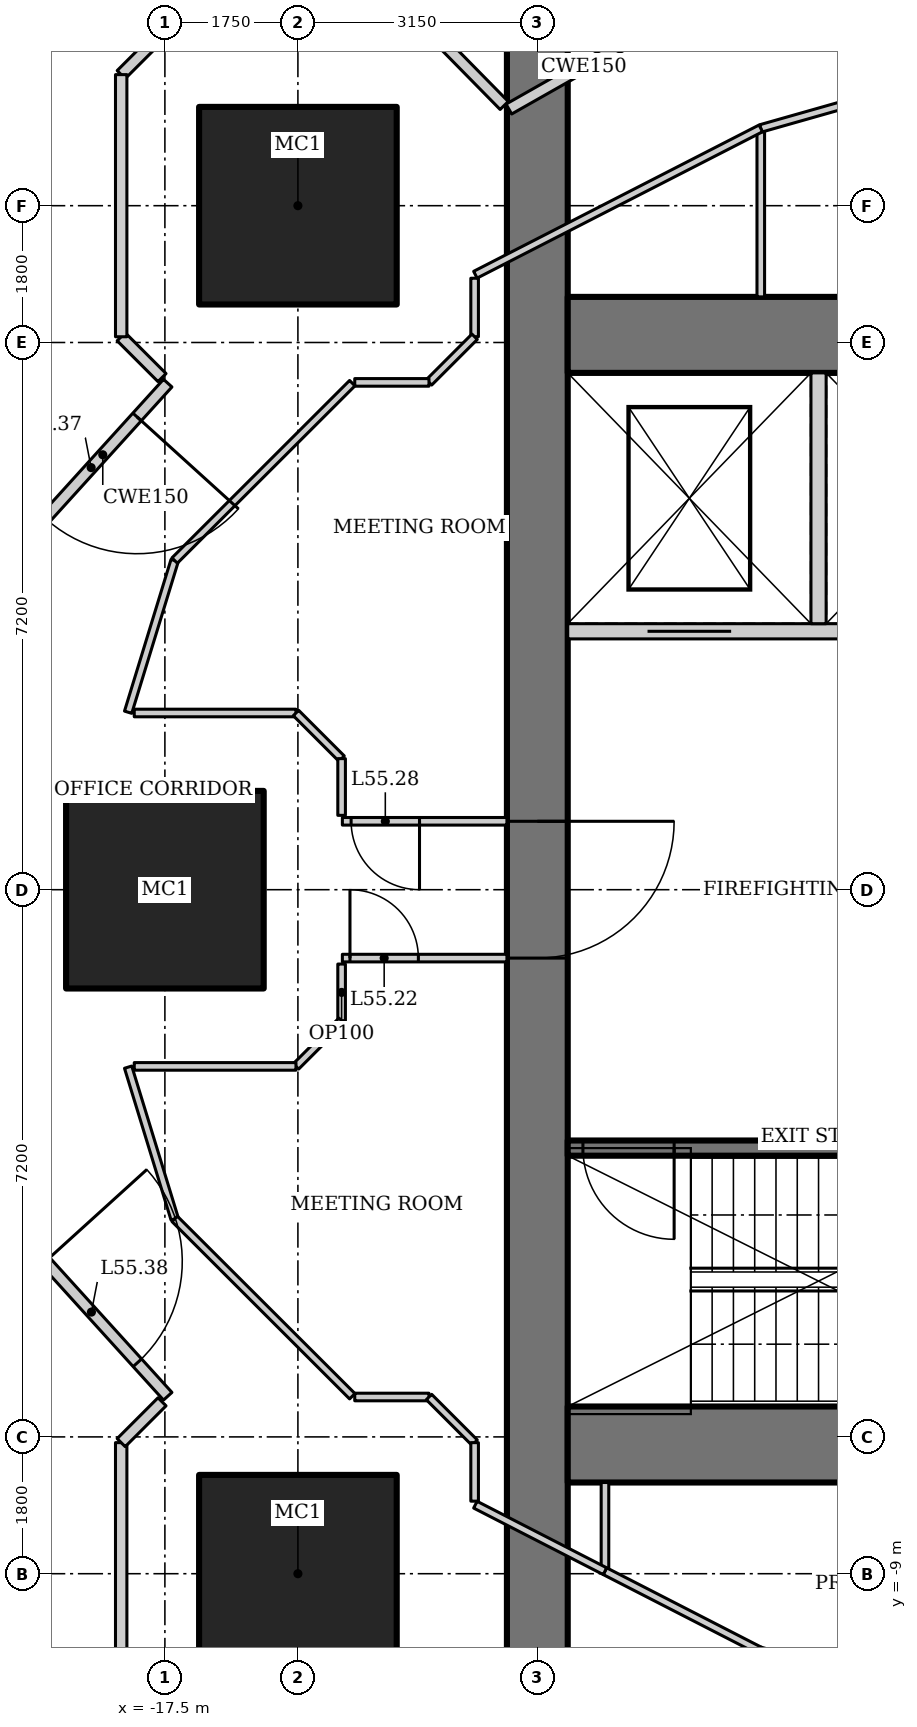
"""IFC4 building model, lengths in metres.
Left out: names, types, materials, properties, quantities, classifications, styles, units other than length and angle.
Written with IfcOpenShell. Run it as: python <this file> out.ifc"""

import sys

from ifc_helpers import new_model, si_unit, direction, frame, frame_2d, origin, origin_2d, place, context, subcontext, project, spatial, rectangle, hollow_rectangle, extrude, element, fill, save


model = new_model("IFC4")
c1 = context("Model", 3, precision=1e-05, world=origin(), true_north=direction((0.0, 1.0)))
c2 = subcontext(c1, "Body", "Model", "MODEL_VIEW")
j1 = project(units=[si_unit("LENGTHUNIT", "METRE"), si_unit("PLANEANGLEUNIT", "RADIAN")], contexts=[c1])
p1 = place(None, origin())
s1 = spatial("IfcSite", under=j1, at=p1, CompositionType="ELEMENT")
p2 = place(p1, origin())
s2 = spatial("IfcBuilding", under=s1, at=p2, CompositionType="ELEMENT")
p3 = place(p2, frame((0.0, 0.0, 236.8)))
s3 = spatial("IfcBuildingStorey", under=s2, at=p3, CompositionType="ELEMENT", Elevation=236.8)
for number, where, z_axis, x_axis in (
    (1, (-15.75, 9.0, 0.0), (0.0, 0.0, 1.0), (1.0, 0.0, 0.0)),
    (2, (-17.5, 0.0, 0.0), (0.0, 0.0, 1.0), (1.0, 0.0, 0.0)),
    (3, (-15.75, -9.0, 0.0), (0.0, 0.0, 1.0), (1.0, 0.0, 0.0)),
):
    element("IfcColumn", number, at=place(p3, frame(where, z_axis=z_axis, x_axis=x_axis)), inside=s3, PredefinedType="COLUMN", context=c2, shape_type="SweptSolid", body=[
        extrude(hollow_rectangle(XDim=2.6, YDim=2.6, WallThickness=0.13, at=origin_2d()), origin(), (0.0, 0.0, 1.0), 4.2),
    ])
p4 = place(p3, frame((-12.6, 13.0, 0.0), z_axis=(0.0, 0.0, 1.0), x_axis=(0.0, -1.0, 0.0)))
e4 = element("IfcWall", 4, at=p4, inside=s3, PredefinedType="SHEAR", context=c2, shape_type="SweptSolid", body=[
    extrude(rectangle(XDim=26.0, YDim=0.8, at=frame_2d((13.0, 0.0))), origin(), (0.0, 0.0, 1.0), 4.2),
])
p5 = place(p4, frame((12.1, 0.0, 0.0)))
e5 = element("IfcOpeningElement", 5, at=p5, cuts=e4, PredefinedType="OPENING", context=c2, shape_type="SweptSolid", body=[
    extrude(rectangle(XDim=1.8, YDim=2.1, at=frame_2d((0.9, 1.05))), frame((0.0, 0.41, 0.0), z_axis=(0.0, -1.0, 0.0), x_axis=(1.0, 0.0, 0.0)), (0.0, 0.0, 1.0), 0.82),
])
p6 = place(p3, frame((-12.2, -7.3, 0.0), z_axis=(0.0, 0.0, 1.0), x_axis=(1.0, 0.0, 0.0)))
e6 = element("IfcWall", 6, at=p6, inside=s3, PredefinedType="SHEAR", context=c2, shape_type="SweptSolid", body=[
    extrude(rectangle(XDim=24.4, YDim=1.0, at=frame_2d((12.2, 0.0))), origin(), (0.0, 0.0, 1.0), 4.2),
])
p7 = place(p3, frame((-5.6, 7.3, 0.0), z_axis=(0.0, 0.0, 1.0), x_axis=(-1.0, 0.0, 0.0)))
e7 = element("IfcWall", 7, at=p7, inside=s3, PredefinedType="SHEAR", context=c2, shape_type="SweptSolid", body=[
    extrude(rectangle(XDim=6.6, YDim=1.0, at=frame_2d((3.3, 0.0))), origin(), (0.0, 0.0, 1.0), 4.2),
])
p8 = place(p3, frame((-5.6, -3.4, 0.0), z_axis=(0.0, 0.0, 1.0), x_axis=(-1.0, 0.0, 0.0)))
e8 = element("IfcWall", 8, at=p8, inside=s3, PredefinedType="SHEAR", context=c2, shape_type="SweptSolid", body=[
    extrude(rectangle(XDim=6.6, YDim=0.2, at=frame_2d((3.3, 0.0))), origin(), (0.0, 0.0, 1.0), 4.2),
])
p9 = place(p8, frame((5.2, 0.0, 0.0)))
e9 = element("IfcOpeningElement", 9, at=p9, cuts=e8, PredefinedType="OPENING", context=c2, shape_type="SweptSolid", body=[
    extrude(rectangle(XDim=1.2, YDim=2.1, at=frame_2d((0.6, 1.05))), frame((0.0, 0.11, 0.0), z_axis=(0.0, -1.0, 0.0), x_axis=(1.0, 0.0, 0.0)), (0.0, 0.0, 1.0), 0.22),
])
p10 = place(p3, frame((-12.2, 3.4, 0.0), z_axis=(0.0, 0.0, 1.0), x_axis=(1.0, 0.0, 0.0)))
e10 = element("IfcWall", 10, at=p10, inside=s3, PredefinedType="SOLIDWALL", context=c2, shape_type="SweptSolid", body=[
    extrude(rectangle(XDim=6.6, YDim=0.2, at=frame_2d((3.3, 0.0))), origin(), (0.0, 0.0, 1.0), 4.2),
])
p11 = place(p10, frame((1.05, 0.0, 0.0)))
e11 = element("IfcOpeningElement", 11, at=p11, cuts=e10, PredefinedType="OPENING", context=c2, shape_type="SweptSolid", body=[
    extrude(rectangle(XDim=1.1, YDim=2.2, at=frame_2d((0.55, 1.1))), frame((0.0, 0.11, 0.0), z_axis=(0.0, -1.0, 0.0), x_axis=(1.0, 0.0, 0.0)), (0.0, 0.0, 1.0), 0.22),
])
p12 = place(p10, frame((4.3, 0.0, 0.0)))
e12 = element("IfcOpeningElement", 12, at=p12, cuts=e10, PredefinedType="OPENING", context=c2, shape_type="SweptSolid", body=[
    extrude(rectangle(XDim=1.4, YDim=2.2, at=frame_2d((0.7, 1.1))), frame((0.0, 0.11, 0.0), z_axis=(0.0, -1.0, 0.0), x_axis=(1.0, 0.0, 0.0)), (0.0, 0.0, 1.0), 0.22),
])
p13 = place(p3, frame((-8.9, 3.5, 0.0), z_axis=(0.0, 0.0, 1.0), x_axis=(0.0, 1.0, 0.0)))
e13 = element("IfcWall", 13, at=p13, inside=s3, PredefinedType="SOLIDWALL", context=c2, shape_type="SweptSolid", body=[
    extrude(rectangle(XDim=3.3, YDim=0.2, at=frame_2d((1.65, 0.0))), origin(), (0.0, 0.0, 1.0), 4.2),
])
p14 = place(p3, frame((-11.71, -7.8, 0.0), z_axis=(0.0, 0.0, 1.0), x_axis=(0.0, -1.0, 0.0)))
e14 = element("IfcWall", 14, at=p14, inside=s3, PredefinedType="PARTITIONING", context=c2, shape_type="SweptSolid", body=[
    extrude(rectangle(XDim=1.167, YDim=0.1, at=frame_2d((0.583, 0.0))), origin(), (0.0, 0.0, 1.0), 4.05),
])
p15 = place(p3, frame((-5.68, -11.147, 0.0), z_axis=(0.0, 0.0, 1.0), x_axis=(-0.961973498971, 0.273142796496, 0.0)))
e15 = element("IfcWall", 15, at=p15, inside=s3, PredefinedType="PARTITIONING", context=c2, shape_type="SweptSolid", body=[
    extrude(rectangle(XDim=4.148, YDim=0.1, at=frame_2d((2.074, 0.0))), origin(), (0.0, 0.0, 1.0), 4.05),
])
p16 = place(p15, frame((1.624, 0.0, 0.0)))
e16 = element("IfcOpeningElement", 16, at=p16, cuts=e15, PredefinedType="OPENING", context=c2, shape_type="SweptSolid", body=[
    extrude(rectangle(XDim=0.9, YDim=2.1, at=frame_2d((0.45, 1.05))), frame((0.0, 0.06, 0.0), z_axis=(0.0, -1.0, 0.0), x_axis=(1.0, 0.0, 0.0)), (0.0, 0.0, 1.0), 0.12),
])
p17 = place(p3, frame((-9.67, -10.014, 0.0), z_axis=(0.0, 0.0, 1.0), x_axis=(-0.889605609385, 0.456729525814, 0.0)))
e17 = element("IfcWall", 17, at=p17, inside=s3, PredefinedType="PARTITIONING", context=c2, shape_type="SweptSolid", body=[
    extrude(rectangle(XDim=2.293, YDim=0.1, at=frame_2d((1.146, 0.0))), origin(), (0.0, 0.0, 1.0), 4.05),
])
p18 = place(p3, frame((-9.66, 10.017, 0.0), z_axis=(0.0, 0.0, 1.0), x_axis=(0.0, -1.0, 0.0)))
e18 = element("IfcWall", 18, at=p18, inside=s3, PredefinedType="PARTITIONING", context=c2, shape_type="SweptSolid", body=[
    extrude(rectangle(XDim=2.217, YDim=0.1, at=frame_2d((1.108, 0.0))), origin(), (0.0, 0.0, 1.0), 4.05),
])
p19 = place(p3, frame((-9.66, 10.017, 0.0), z_axis=(0.0, 0.0, 1.0), x_axis=(0.961970251804, 0.27315423234, 0.0)))
e19 = element("IfcWall", 19, at=p19, inside=s3, PredefinedType="PARTITIONING", context=c2, shape_type="SweptSolid", body=[
    extrude(rectangle(XDim=4.137, YDim=0.1, at=frame_2d((2.069, 0.0))), origin(), (0.0, 0.0, 1.0), 4.05),
])
p20 = place(p3, frame((-17.372, -4.331, 0.0), z_axis=(0.0, 0.0, 1.0), x_axis=(-0.293231279211, 0.956041535129, 0.0)))
e20 = element("IfcWall", 20, at=p20, inside=s3, PredefinedType="PARTITIONING", context=c2, shape_type="SweptSolid", body=[
    extrude(rectangle(XDim=2.088, YDim=0.1, at=frame_2d((1.044, 0.0))), origin(), (0.0, 0.0, 1.0), 4.05),
])
p21 = place(p3, frame((-15.165, -0.9, 0.0), z_axis=(0.0, 0.0, 1.0), x_axis=(1.0, 0.0, 0.0)))
e21 = element("IfcWall", 21, at=p21, inside=s3, PredefinedType="PARTITIONING", context=c2, shape_type="SweptSolid", body=[
    extrude(rectangle(XDim=2.165, YDim=0.1, at=frame_2d((1.083, 0.0))), origin(), (0.0, 0.0, 1.0), 4.05),
])
p22 = place(p21, frame((0.1, 0.0, 0.0)))
e22 = element("IfcOpeningElement", 22, at=p22, cuts=e21, PredefinedType="OPENING", context=c2, shape_type="SweptSolid", body=[
    extrude(rectangle(XDim=0.9, YDim=2.1, at=frame_2d((0.45, 1.05))), frame((0.0, 0.06, 0.0), z_axis=(0.0, -1.0, 0.0), x_axis=(1.0, 0.0, 0.0)), (0.0, 0.0, 1.0), 0.12),
])
p23 = place(p3, frame((-13.0, 0.9, 0.0), z_axis=(0.0, 0.0, 1.0), x_axis=(-1.0, 0.0, 0.0)))
e23 = element("IfcWall", 23, at=p23, inside=s3, PredefinedType="PARTITIONING", context=c2, shape_type="SweptSolid", body=[
    extrude(rectangle(XDim=2.165, YDim=0.1, at=frame_2d((1.083, 0.0))), origin(), (0.0, 0.0, 1.0), 4.05),
])
p24 = place(p23, frame((1.15, 0.0, 0.0)))
e24 = element("IfcOpeningElement", 24, at=p24, cuts=e23, PredefinedType="OPENING", context=c2, shape_type="SweptSolid", body=[
    extrude(rectangle(XDim=0.9, YDim=2.1, at=frame_2d((0.45, 1.05))), frame((0.0, 0.06, 0.0), z_axis=(0.0, -1.0, 0.0), x_axis=(1.0, 0.0, 0.0)), (0.0, 0.0, 1.0), 0.12),
])
p25 = place(p3, frame((-17.984, 2.335, 0.0), z_axis=(0.0, 0.0, 1.0), x_axis=(0.293231279211, 0.956041535129, 0.0)))
e25 = element("IfcWall", 25, at=p25, inside=s3, PredefinedType="PARTITIONING", context=c2, shape_type="SweptSolid", body=[
    extrude(rectangle(XDim=2.088, YDim=0.1, at=frame_2d((1.044, 0.0))), origin(), (0.0, 0.0, 1.0), 4.05),
])
p26 = place(p3, frame((-15.175, -0.978, 0.0), z_axis=(0.0, 0.0, 1.0), x_axis=(0.0, -1.0, 0.0)))
e26 = element("IfcWall", 26, at=p26, inside=s3, PredefinedType="PARTITIONING", context=c2, shape_type="SweptSolid", body=[
    extrude(rectangle(XDim=0.746, YDim=0.1, at=frame_2d((0.373, 0.0))), origin(), (0.0, 0.0, 1.0), 4.05),
])
p27 = place(p3, frame((-15.175, -1.725, 0.0), z_axis=(0.0, 0.0, 1.0), x_axis=(-0.707106781187, -0.707106781187, 0.0)))
e27 = element("IfcWall", 27, at=p27, inside=s3, PredefinedType="PARTITIONING", context=c2, shape_type="SweptSolid", body=[
    extrude(rectangle(XDim=0.849, YDim=0.1, at=frame_2d((0.425, 0.0))), origin(), (0.0, 0.0, 1.0), 4.05),
])
for number, where, z_axis, x_axis in (
    (28, (-15.775, -2.325, 0.0), (0.0, 0.0, 1.0), (-1.0, 0.0, 0.0)),
    (29, (-17.903, 2.325, 0.0), (0.0, 0.0, 1.0), (1.0, 0.0, 0.0)),
):
    element("IfcWall", number, at=place(p3, frame(where, z_axis=z_axis, x_axis=x_axis)), inside=s3, PredefinedType="PARTITIONING", context=c2, shape_type="SweptSolid", body=[
        extrude(rectangle(XDim=2.128, YDim=0.1, at=frame_2d((1.064, 0.0))), origin(), (0.0, 0.0, 1.0), 4.05),
    ])
p28 = place(p3, frame((-15.775, 2.325, 0.0), z_axis=(0.0, 0.0, 1.0), x_axis=(0.707106781187, -0.707106781187, 0.0)))
e30 = element("IfcWall", 30, at=p28, inside=s3, PredefinedType="PARTITIONING", context=c2, shape_type="SweptSolid", body=[
    extrude(rectangle(XDim=0.849, YDim=0.1, at=frame_2d((0.425, 0.0))), origin(), (0.0, 0.0, 1.0), 4.05),
])
p29 = place(p3, frame((-15.175, 1.725, 0.0), z_axis=(0.0, 0.0, 1.0), x_axis=(0.0, -1.0, 0.0)))
e31 = element("IfcWall", 31, at=p29, inside=s3, PredefinedType="PARTITIONING", context=c2, shape_type="SweptSolid", body=[
    extrude(rectangle(XDim=0.746, YDim=0.1, at=frame_2d((0.373, 0.0))), origin(), (0.0, 0.0, 1.0), 4.05),
])
p30 = place(p3, frame((-19.172, -4.78, 0.0), z_axis=(0.0, 0.0, 1.0), x_axis=(0.671721890643, -0.74080341632, 0.0)))
e32 = element("IfcWall", 32, at=p30, inside=s3, PredefinedType="PARTITIONING", context=c2, shape_type="SweptSolid", body=[
    extrude(rectangle(XDim=2.544, YDim=0.15, at=frame_2d((1.272, 0.0))), origin(), (0.0, 0.0, 1.0), 4.05),
])
p31 = place(p30, frame((0.15, 0.0, 0.0)))
e33 = element("IfcOpeningElement", 33, at=p31, cuts=e32, PredefinedType="OPENING", context=c2, shape_type="SweptSolid", body=[
    extrude(rectangle(XDim=1.8, YDim=2.1, at=frame_2d((0.9, 1.05))), frame((0.0, 0.085, 0.0), z_axis=(0.0, -1.0, 0.0), x_axis=(1.0, 0.0, 0.0)), (0.0, 0.0, 1.0), 0.17),
])
p32 = place(p3, frame((-11.71, -8.967, 0.0), z_axis=(0.0, 0.0, 1.0), x_axis=(-0.889638356137, 0.456665736935, 0.0)))
e34 = element("IfcWall", 34, at=p32, inside=s3, PredefinedType="PARTITIONING", context=c2, shape_type="SweptSolid", body=[
    extrude(rectangle(XDim=1.917, YDim=0.1, at=frame_2d((0.958, 0.0))), origin(), (0.0, 0.0, 1.0), 4.05),
])
p33 = place(p3, frame((-15.035, -6.665, 0.0), z_axis=(0.0, 0.0, 1.0), x_axis=(-0.707587114823, 0.70662612104, 0.0)))
e35 = element("IfcWall", 35, at=p33, inside=s3, PredefinedType="PARTITIONING", context=c2, shape_type="SweptSolid", body=[
    extrude(rectangle(XDim=3.303, YDim=0.1, at=frame_2d((1.651, 0.0))), origin(), (0.0, 0.0, 1.0), 4.05),
])
p34 = place(p3, frame((-15.002, -6.675, 0.0), z_axis=(0.0, 0.0, 1.0), x_axis=(1.0, 0.0, 0.0)))
e36 = element("IfcWall", 36, at=p34, inside=s3, PredefinedType="PARTITIONING", context=c2, shape_type="SweptSolid", body=[
    extrude(rectangle(XDim=0.977, YDim=0.1, at=frame_2d((0.488, 0.0))), origin(), (0.0, 0.0, 1.0), 4.05),
])
p35 = place(p3, frame((-14.025, -6.675, 0.0), z_axis=(0.0, 0.0, 1.0), x_axis=(0.707106781187, -0.707106781187, 0.0)))
e37 = element("IfcWall", 37, at=p35, inside=s3, PredefinedType="PARTITIONING", context=c2, shape_type="SweptSolid", body=[
    extrude(rectangle(XDim=0.849, YDim=0.1, at=frame_2d((0.425, 0.0))), origin(), (0.0, 0.0, 1.0), 4.05),
])
p36 = place(p3, frame((-13.425, -7.275, 0.0), z_axis=(0.0, 0.0, 1.0), x_axis=(0.0, -1.0, 0.0)))
e38 = element("IfcWall", 38, at=p36, inside=s3, PredefinedType="PARTITIONING", context=c2, shape_type="SweptSolid", body=[
    extrude(rectangle(XDim=0.77, YDim=0.1, at=frame_2d((0.385, 0.0))), origin(), (0.0, 0.0, 1.0), 4.05),
])
p37 = place(p3, frame((-18.075, -10.725, 0.0), z_axis=(0.0, 0.0, 1.0), x_axis=(0.0, 1.0, 0.0)))
e39 = element("IfcWall", 39, at=p37, inside=s3, PredefinedType="PARTITIONING", context=c2, shape_type="SweptSolid", body=[
    extrude(rectangle(XDim=3.449, YDim=0.15, at=frame_2d((1.725, 0.0))), origin(), (0.0, 0.0, 1.0), 3.6),
])
p38 = place(p3, frame((-18.075, -7.275, 0.0), z_axis=(0.0, 0.0, 1.0), x_axis=(0.707106781187, 0.707106781187, 0.0)))
e40 = element("IfcWall", 40, at=p38, inside=s3, PredefinedType="PARTITIONING", context=c2, shape_type="SweptSolid", body=[
    extrude(rectangle(XDim=0.76, YDim=0.15, at=frame_2d((0.38, 0.0))), origin(), (0.0, 0.0, 1.0), 4.05),
])
p39 = place(p3, frame((-11.001, 11.392, 0.0), z_axis=(0.0, 0.0, 1.0), x_axis=(-0.869722107117, -0.493541747366, 0.0)))
e41 = element("IfcWall", 41, at=p39, inside=s3, PredefinedType="PARTITIONING", context=c2, shape_type="SweptSolid", body=[
    extrude(rectangle(XDim=2.27, YDim=0.15, at=frame_2d((1.135, 0.0))), origin(), (0.0, 0.0, 1.0), 4.05),
])
p40 = place(p3, frame((-17.463, 6.665, 0.0), z_axis=(0.0, 0.0, 1.0), x_axis=(-0.671721890643, -0.74080341632, 0.0)))
e42 = element("IfcWall", 42, at=p40, inside=s3, PredefinedType="PARTITIONING", context=c2, shape_type="SweptSolid", body=[
    extrude(rectangle(XDim=2.544, YDim=0.15, at=frame_2d((1.272, 0.0))), origin(), (0.0, 0.0, 1.0), 4.05),
])
p41 = place(p40, frame((0.6, 0.0, 0.0)))
e43 = element("IfcOpeningElement", 43, at=p41, cuts=e42, PredefinedType="OPENING", context=c2, shape_type="SweptSolid", body=[
    extrude(rectangle(XDim=1.8, YDim=2.1, at=frame_2d((0.9, 1.05))), frame((0.0, 0.085, 0.0), z_axis=(0.0, -1.0, 0.0), x_axis=(1.0, 0.0, 0.0)), (0.0, 0.0, 1.0), 0.17),
])
p42 = place(p3, frame((-17.372, 4.331, 0.0), z_axis=(0.0, 0.0, 1.0), x_axis=(0.707587114823, 0.70662612104, 0.0)))
e44 = element("IfcWall", 44, at=p42, inside=s3, PredefinedType="PARTITIONING", context=c2, shape_type="SweptSolid", body=[
    extrude(rectangle(XDim=3.303, YDim=0.1, at=frame_2d((1.651, 0.0))), origin(), (0.0, 0.0, 1.0), 4.05),
])
p43 = place(p3, frame((-13.415, 8.092, 0.0), z_axis=(0.0, 0.0, 1.0), x_axis=(0.889833724874, 0.456284935185, 0.0)))
e45 = element("IfcWall", 45, at=p43, inside=s3, PredefinedType="PARTITIONING", context=c2, shape_type="SweptSolid", body=[
    extrude(rectangle(XDim=4.22, YDim=0.1, at=frame_2d((2.11, 0.0))), origin(), (0.0, 0.0, 1.0), 4.05),
])
p44 = place(p3, frame((-13.425, 8.045, 0.0), z_axis=(0.0, 0.0, 1.0), x_axis=(0.0, -1.0, 0.0)))
e46 = element("IfcWall", 46, at=p44, inside=s3, PredefinedType="PARTITIONING", context=c2, shape_type="SweptSolid", body=[
    extrude(rectangle(XDim=0.77, YDim=0.1, at=frame_2d((0.385, 0.0))), origin(), (0.0, 0.0, 1.0), 4.05),
])
p45 = place(p3, frame((-13.425, 7.275, 0.0), z_axis=(0.0, 0.0, 1.0), x_axis=(-0.707106781187, -0.707106781187, 0.0)))
e47 = element("IfcWall", 47, at=p45, inside=s3, PredefinedType="PARTITIONING", context=c2, shape_type="SweptSolid", body=[
    extrude(rectangle(XDim=0.849, YDim=0.1, at=frame_2d((0.425, 0.0))), origin(), (0.0, 0.0, 1.0), 4.05),
])
p46 = place(p3, frame((-14.025, 6.675, 0.0), z_axis=(0.0, 0.0, 1.0), x_axis=(-1.0, 0.0, 0.0)))
e48 = element("IfcWall", 48, at=p46, inside=s3, PredefinedType="PARTITIONING", context=c2, shape_type="SweptSolid", body=[
    extrude(rectangle(XDim=0.977, YDim=0.1, at=frame_2d((0.488, 0.0))), origin(), (0.0, 0.0, 1.0), 4.05),
])
p47 = place(p3, frame((-18.075, 10.725, 0.0), z_axis=(0.0, 0.0, 1.0), x_axis=(0.707106781187, 0.707106781187, 0.0)))
e49 = element("IfcWall", 49, at=p47, inside=s3, PredefinedType="PARTITIONING", context=c2, shape_type="SweptSolid", body=[
    extrude(rectangle(XDim=0.849, YDim=0.15, at=frame_2d((0.425, 0.0))), origin(), (0.0, 0.0, 1.0), 4.05),
])
p48 = place(p3, frame((-14.025, 11.325, 0.0), z_axis=(0.0, 0.0, 1.0), x_axis=(0.701113567316, -0.713049623606, 0.0)))
e50 = element("IfcWall", 50, at=p48, inside=s3, PredefinedType="PARTITIONING", context=c2, shape_type="SweptSolid", body=[
    extrude(rectangle(XDim=1.411, YDim=0.15, at=frame_2d((0.706, 0.0))), origin(), (0.0, 0.0, 1.0), 4.05),
])
p49 = place(p3, frame((-17.538, 6.738, 0.0), z_axis=(0.0, 0.0, 1.0), x_axis=(-0.707106781187, 0.707106781187, 0.0)))
e51 = element("IfcWall", 51, at=p49, inside=s3, PredefinedType="PARTITIONING", context=c2, shape_type="SweptSolid", body=[
    extrude(rectangle(XDim=0.76, YDim=0.15, at=frame_2d((0.38, 0.0))), origin(), (0.0, 0.0, 1.0), 4.05),
])
p50 = place(p3, frame((-18.075, 7.275, 0.0), z_axis=(0.0, 0.0, 1.0), x_axis=(0.0, 1.0, 0.0)))
e52 = element("IfcWall", 52, at=p50, inside=s3, PredefinedType="PARTITIONING", context=c2, shape_type="SweptSolid", body=[
    extrude(rectangle(XDim=3.449, YDim=0.15, at=frame_2d((1.725, 0.0))), origin(), (0.0, 0.0, 1.0), 3.6),
])
p51 = place(p9, origin())
e53 = element("IfcDoor", 53, at=p51, inside=s3, OperationType="SINGLE_SWING_RIGHT", PredefinedType="DOOR", context=c2, shape_type="SweptSolid", body=[
    extrude(rectangle(XDim=1.2, YDim=2.1, at=frame_2d((0.6, 1.05))), frame((0.0, 0.025, 0.0), z_axis=(0.0, -1.0, 0.0), x_axis=(1.0, 0.0, 0.0)), (0.0, 0.0, 1.0), 0.05),
])
fill(e9, e53)
p52 = place(p5, origin())
e54 = element("IfcDoor", 54, at=p52, inside=s3, OperationType="DOUBLE_DOOR_DOUBLE_SWING", PredefinedType="DOOR", context=c2, shape_type="SweptSolid", body=[
    extrude(rectangle(XDim=1.8, YDim=2.1, at=frame_2d((0.9, 1.05))), frame((0.0, 0.025, 0.0), z_axis=(0.0, -1.0, 0.0), x_axis=(1.0, 0.0, 0.0)), (0.0, 0.0, 1.0), 0.05),
])
fill(e5, e54)
p53 = place(p11, origin())
e55 = element("IfcDoor", 55, at=p53, inside=s3, OperationType="DOUBLE_DOOR_SLIDING", PredefinedType="DOOR", context=c2, shape_type="SweptSolid", body=[
    extrude(rectangle(XDim=1.1, YDim=2.2, at=frame_2d((0.55, 1.1))), frame((0.0, 0.025, 0.0), z_axis=(0.0, -1.0, 0.0), x_axis=(1.0, 0.0, 0.0)), (0.0, 0.0, 1.0), 0.05),
])
fill(e11, e55)
p54 = place(p22, origin())
e56 = element("IfcDoor", 56, at=p54, inside=s3, OperationType="SINGLE_SWING_LEFT", PredefinedType="DOOR", context=c2, shape_type="SweptSolid", body=[
    extrude(rectangle(XDim=0.9, YDim=2.1, at=frame_2d((0.45, 1.05))), frame((0.0, 0.025, 0.0), z_axis=(0.0, -1.0, 0.0), x_axis=(1.0, 0.0, 0.0)), (0.0, 0.0, 1.0), 0.05),
])
fill(e22, e56)
p55 = place(p24, origin())
e57 = element("IfcDoor", 57, at=p55, inside=s3, OperationType="SINGLE_SWING_LEFT", PredefinedType="DOOR", context=c2, shape_type="SweptSolid", body=[
    extrude(rectangle(XDim=0.9, YDim=2.1, at=frame_2d((0.45, 1.05))), frame((0.0, 0.025, 0.0), z_axis=(0.0, -1.0, 0.0), x_axis=(1.0, 0.0, 0.0)), (0.0, 0.0, 1.0), 0.05),
])
fill(e24, e57)
p56 = place(p41, origin())
e58 = element("IfcDoor", 58, at=p56, inside=s3, OperationType="DOUBLE_DOOR_DOUBLE_SWING", PredefinedType="DOOR", context=c2, shape_type="SweptSolid", body=[
    extrude(rectangle(XDim=1.8, YDim=2.1, at=frame_2d((0.9, 1.05))), frame((0.0, 0.025, 0.0), z_axis=(0.0, -1.0, 0.0), x_axis=(1.0, 0.0, 0.0)), (0.0, 0.0, 1.0), 0.05),
])
fill(e43, e58)
p57 = place(p31, origin())
e59 = element("IfcDoor", 59, at=p57, inside=s3, OperationType="DOUBLE_DOOR_DOUBLE_SWING", PredefinedType="DOOR", context=c2, shape_type="SweptSolid", body=[
    extrude(rectangle(XDim=1.8, YDim=2.1, at=frame_2d((0.9, 1.05))), frame((0.0, 0.025, 0.0), z_axis=(0.0, -1.0, 0.0), x_axis=(1.0, 0.0, 0.0)), (0.0, 0.0, 1.0), 0.05),
])
fill(e33, e59)
save(model, sys.argv[1])
